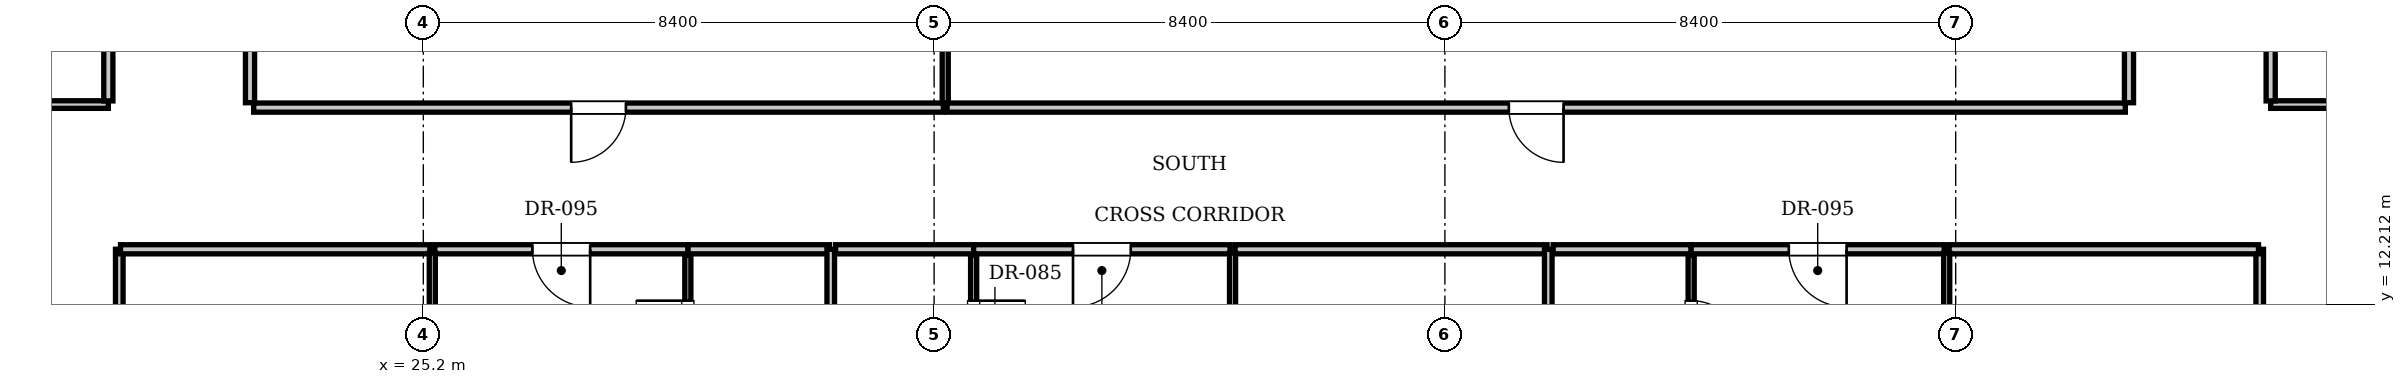
"""IFC4 building model, lengths in metres.
Left out: names, types, materials, properties, quantities, classifications, styles, units other than length and angle.
Written with IfcOpenShell. Run it as: python <this file> out.ifc"""

import sys

from ifc_helpers import new_model, si_unit, direction, frame, frame_2d, origin, place, context, subcontext, project, spatial, rectangle, extrude, element, fill, save


model = new_model("IFC4")
c1 = context("Model", 3, precision=1e-05, world=origin(), true_north=direction((0.0, 1.0)))
c2 = subcontext(c1, "Body", "Model", "MODEL_VIEW")
j1 = project(units=[si_unit("LENGTHUNIT", "METRE"), si_unit("PLANEANGLEUNIT", "RADIAN")], contexts=[c1])
p1 = place(None, origin())
s1 = spatial("IfcSite", under=j1, at=p1, CompositionType="ELEMENT")
p2 = place(p1, origin())
s2 = spatial("IfcBuilding", under=s1, at=p2, CompositionType="ELEMENT")
p3 = place(p2, frame((0.0, 0.0, 73.15)))
s3 = spatial("IfcBuildingStorey", under=s2, at=p3, CompositionType="ELEMENT", Elevation=73.15)
for number, where, z_axis, x_axis in (
    (1, (22.35, 15.53, 0.0), (0.0, 0.0, 1.0), (0.0, 1.0, 0.0)),
    (2, (53.25, 15.53, 0.0), (0.0, 0.0, 1.0), (0.0, 1.0, 0.0)),
):
    element("IfcWall", number, at=place(p3, frame(where, z_axis=z_axis, x_axis=x_axis)), inside=s3, PredefinedType="PARTITIONING", context=c2, shape_type="SweptSolid", body=[
        extrude(rectangle(XDim=8.34, YDim=0.15, at=frame_2d((4.17, 0.0))), origin(), (0.0, 0.0, 1.0), 3.61),
    ])
p4 = place(p3, frame((22.41, 15.45, 0.0), z_axis=(0.0, 0.0, 1.0), x_axis=(1.0, 0.0, 0.0)))
e3 = element("IfcWall", 3, at=p4, inside=s3, PredefinedType="PARTITIONING", context=c2, shape_type="SweptSolid", body=[
    extrude(rectangle(XDim=11.343, YDim=0.15, at=frame_2d((5.671, 0.0))), origin(), (0.0, 0.0, 1.0), 3.61),
])
p5 = place(p4, frame((5.221, 0.0, 0.0)))
e4 = element("IfcOpeningElement", 4, at=p5, cuts=e3, PredefinedType="OPENING", context=c2, shape_type="SweptSolid", body=[
    extrude(rectangle(XDim=0.9, YDim=2.1, at=frame_2d((0.45, 1.05))), frame((0.0, 0.085, 0.0), z_axis=(0.0, -1.0, 0.0), x_axis=(1.0, 0.0, 0.0)), (0.0, 0.0, 1.0), 0.17),
])
p6 = place(p3, frame((33.783, 15.53, 0.0), z_axis=(0.0, 0.0, 1.0), x_axis=(0.0, 1.0, 0.0)))
e5 = element("IfcWall", 5, at=p6, inside=s3, PredefinedType="PARTITIONING", context=c2, shape_type="SweptSolid", body=[
    extrude(rectangle(XDim=8.34, YDim=0.1, at=frame_2d((4.17, 0.0))), origin(), (0.0, 0.0, 1.0), 2.999),
])
p7 = place(p3, frame((33.813, 15.45, 0.0), z_axis=(0.0, 0.0, 1.0), x_axis=(1.0, 0.0, 0.0)))
e6 = element("IfcWall", 6, at=p7, inside=s3, PredefinedType="PARTITIONING", context=c2, shape_type="SweptSolid", body=[
    extrude(rectangle(XDim=19.377, YDim=0.15, at=frame_2d((9.688, 0.0))), origin(), (0.0, 0.0, 1.0), 3.61),
])
p8 = place(p7, frame((9.239, 0.0, 0.0)))
e7 = element("IfcOpeningElement", 7, at=p8, cuts=e6, PredefinedType="OPENING", context=c2, shape_type="SweptSolid", body=[
    extrude(rectangle(XDim=0.9, YDim=2.1, at=frame_2d((0.45, 1.05))), frame((0.0, 0.085, 0.0), z_axis=(0.0, -1.0, 0.0), x_axis=(1.0, 0.0, 0.0)), (0.0, 0.0, 1.0), 0.17),
])
for number, where, z_axis, x_axis in (
    (8, (20.2, 0.1, 0.0), (0.0, 0.0, 1.0), (0.0, 1.0, 0.0)),
    (9, (55.4, 0.1, 0.0), (0.0, 0.0, 1.0), (0.0, 1.0, 0.0)),
):
    element("IfcWall", number, at=place(p3, frame(where, z_axis=z_axis, x_axis=x_axis)), inside=s3, PredefinedType="PARTITIONING", context=c2, shape_type="SweptSolid", body=[
        extrude(rectangle(XDim=13.02, YDim=0.125, at=frame_2d((6.51, 0.0))), origin(), (0.0, 0.0, 1.0), 3.61),
    ])
p9 = place(p3, frame((29.55, 13.12, 0.0), z_axis=(0.0, 0.0, 1.0), x_axis=(1.0, 0.0, 0.0)))
e10 = element("IfcWall", 10, at=p9, inside=s3, PredefinedType="PARTITIONING", context=c2, shape_type="SweptSolid", body=[
    extrude(rectangle(XDim=2.33, YDim=0.15, at=frame_2d((1.165, 0.0))), origin(), (0.0, 0.0, 1.0), 3.61),
])
p10 = place(p3, frame((29.55, 10.68, 0.0), z_axis=(0.0, 0.0, 1.0), x_axis=(0.0, 1.0, 0.0)))
e11 = element("IfcWall", 11, at=p10, inside=s3, PredefinedType="PARTITIONING", context=c2, shape_type="SweptSolid", body=[
    extrude(rectangle(XDim=2.34, YDim=0.1, at=frame_2d((1.17, 0.0))), origin(), (0.0, 0.0, 1.0), 3.61),
])
p11 = place(p10, frame((0.745, 0.0, 0.0)))
e12 = element("IfcOpeningElement", 12, at=p11, cuts=e11, PredefinedType="OPENING", context=c2, shape_type="SweptSolid", body=[
    extrude(rectangle(XDim=0.85, YDim=2.1, at=frame_2d((0.425, 1.05))), frame((0.0, 0.06, 0.0), z_axis=(0.0, -1.0, 0.0), x_axis=(1.0, 0.0, 0.0)), (0.0, 0.0, 1.0), 0.12),
])
p12 = place(p3, frame((20.22, 13.12, 0.0), z_axis=(0.0, 0.0, 1.0), x_axis=(1.0, 0.0, 0.0)))
e13 = element("IfcWall", 13, at=p12, inside=s3, PredefinedType="PARTITIONING", context=c2, shape_type="SweptSolid", body=[
    extrude(rectangle(XDim=5.088, YDim=0.15, at=frame_2d((2.544, 0.0))), origin(), (0.0, 0.0, 1.0), 3.61),
])
p13 = place(p3, frame((25.388, 13.12, 0.0), z_axis=(0.0, 0.0, 1.0), x_axis=(1.0, 0.0, 0.0)))
e14 = element("IfcWall", 14, at=p13, inside=s3, PredefinedType="PARTITIONING", context=c2, shape_type="SweptSolid", body=[
    extrude(rectangle(XDim=4.162, YDim=0.15, at=frame_2d((2.081, 0.0))), origin(), (0.0, 0.0, 1.0), 3.61),
])
p14 = place(p13, frame((1.606, 0.0, 0.0)))
e15 = element("IfcOpeningElement", 15, at=p14, cuts=e14, PredefinedType="OPENING", context=c2, shape_type="SweptSolid", body=[
    extrude(rectangle(XDim=0.95, YDim=2.15, at=frame_2d((0.475, 1.075))), frame((0.0, 0.085, 0.0), z_axis=(0.0, -1.0, 0.0), x_axis=(1.0, 0.0, 0.0)), (0.0, 0.0, 1.0), 0.17),
])
p15 = place(p3, frame((25.348, 0.03, 0.0), z_axis=(0.0, 0.0, 1.0), x_axis=(0.0, 1.0, 0.0)))
e16 = element("IfcWall", 16, at=p15, inside=s3, PredefinedType="PARTITIONING", context=c2, shape_type="SweptSolid", body=[
    extrude(rectangle(XDim=13.03, YDim=0.1, at=frame_2d((6.515, 0.0))), origin(), (0.0, 0.0, 1.0), 2.999),
])
p16 = place(p15, frame((1.6, 0.0, 0.0)))
e17 = element("IfcOpeningElement", 17, at=p16, cuts=e16, PredefinedType="OPENING", context=c2, shape_type="SweptSolid", body=[
    extrude(rectangle(XDim=0.9, YDim=2.1, at=frame_2d((0.45, 1.05))), frame((0.0, 0.06, 0.0), z_axis=(0.0, -1.0, 0.0), x_axis=(1.0, 0.0, 0.0)), (0.0, 0.0, 1.0), 0.12),
])
p17 = place(p3, frame((31.9, 0.1, 0.0), z_axis=(0.0, 0.0, 1.0), x_axis=(0.0, 1.0, 0.0)))
e18 = element("IfcWall", 18, at=p17, inside=s3, PredefinedType="PARTITIONING", context=c2, shape_type="SweptSolid", body=[
    extrude(rectangle(XDim=13.02, YDim=0.125, at=frame_2d((6.51, 0.0))), origin(), (0.0, 0.0, 1.0), 3.61),
])
p18 = place(p3, frame((31.98, 13.12, 0.0), z_axis=(0.0, 0.0, 1.0), x_axis=(1.0, 0.0, 0.0)))
e19 = element("IfcWall", 19, at=p18, inside=s3, PredefinedType="PARTITIONING", context=c2, shape_type="SweptSolid", body=[
    extrude(rectangle(XDim=2.27, YDim=0.15, at=frame_2d((1.135, 0.0))), origin(), (0.0, 0.0, 1.0), 3.61),
])
p19 = place(p3, frame((34.25, 10.68, 0.0), z_axis=(0.0, 0.0, 1.0), x_axis=(0.0, 1.0, 0.0)))
e20 = element("IfcWall", 20, at=p19, inside=s3, PredefinedType="PARTITIONING", context=c2, shape_type="SweptSolid", body=[
    extrude(rectangle(XDim=2.34, YDim=0.1, at=frame_2d((1.17, 0.0))), origin(), (0.0, 0.0, 1.0), 3.61),
])
p20 = place(p19, frame((0.745, 0.0, 0.0)))
e21 = element("IfcOpeningElement", 21, at=p20, cuts=e20, PredefinedType="OPENING", context=c2, shape_type="SweptSolid", body=[
    extrude(rectangle(XDim=0.85, YDim=2.1, at=frame_2d((0.425, 1.05))), frame((0.0, 0.06, 0.0), z_axis=(0.0, -1.0, 0.0), x_axis=(1.0, 0.0, 0.0)), (0.0, 0.0, 1.0), 0.12),
])
p21 = place(p3, frame((34.25, 13.12, 0.0), z_axis=(0.0, 0.0, 1.0), x_axis=(1.0, 0.0, 0.0)))
e22 = element("IfcWall", 22, at=p21, inside=s3, PredefinedType="PARTITIONING", context=c2, shape_type="SweptSolid", body=[
    extrude(rectangle(XDim=4.218, YDim=0.15, at=frame_2d((2.109, 0.0))), origin(), (0.0, 0.0, 1.0), 3.61),
])
p22 = place(p21, frame((1.634, 0.0, 0.0)))
e23 = element("IfcOpeningElement", 23, at=p22, cuts=e22, PredefinedType="OPENING", context=c2, shape_type="SweptSolid", body=[
    extrude(rectangle(XDim=0.95, YDim=2.15, at=frame_2d((0.475, 1.075))), frame((0.0, 0.085, 0.0), z_axis=(0.0, -1.0, 0.0), x_axis=(1.0, 0.0, 0.0)), (0.0, 0.0, 1.0), 0.17),
])
p23 = place(p3, frame((38.548, 13.12, 0.0), z_axis=(0.0, 0.0, 1.0), x_axis=(1.0, 0.0, 0.0)))
e24 = element("IfcWall", 24, at=p23, inside=s3, PredefinedType="PARTITIONING", context=c2, shape_type="SweptSolid", body=[
    extrude(rectangle(XDim=5.132, YDim=0.15, at=frame_2d((2.566, 0.0))), origin(), (0.0, 0.0, 1.0), 3.61),
])
p24 = place(p3, frame((38.508, 0.03, 0.0), z_axis=(0.0, 0.0, 1.0), x_axis=(0.0, 1.0, 0.0)))
e25 = element("IfcWall", 25, at=p24, inside=s3, PredefinedType="PARTITIONING", context=c2, shape_type="SweptSolid", body=[
    extrude(rectangle(XDim=13.03, YDim=0.1, at=frame_2d((6.515, 0.0))), origin(), (0.0, 0.0, 1.0), 3.61),
])
p25 = place(p24, frame((1.6, 0.0, 0.0)))
e26 = element("IfcOpeningElement", 26, at=p25, cuts=e25, PredefinedType="OPENING", context=c2, shape_type="SweptSolid", body=[
    extrude(rectangle(XDim=0.9, YDim=2.1, at=frame_2d((0.45, 1.05))), frame((0.0, 0.06, 0.0), z_axis=(0.0, -1.0, 0.0), x_axis=(1.0, 0.0, 0.0)), (0.0, 0.0, 1.0), 0.12),
])
p26 = place(p3, frame((43.7, 0.1, 0.0), z_axis=(0.0, 0.0, 1.0), x_axis=(0.0, 1.0, 0.0)))
e27 = element("IfcWall", 27, at=p26, inside=s3, PredefinedType="PARTITIONING", context=c2, shape_type="SweptSolid", body=[
    extrude(rectangle(XDim=13.02, YDim=0.125, at=frame_2d((6.51, 0.0))), origin(), (0.0, 0.0, 1.0), 3.61),
])
p27 = place(p3, frame((43.78, 13.12, 0.0), z_axis=(0.0, 0.0, 1.0), x_axis=(1.0, 0.0, 0.0)))
e28 = element("IfcWall", 28, at=p27, inside=s3, PredefinedType="PARTITIONING", context=c2, shape_type="SweptSolid", body=[
    extrude(rectangle(XDim=2.27, YDim=0.15, at=frame_2d((1.135, 0.0))), origin(), (0.0, 0.0, 1.0), 3.61),
])
p28 = place(p3, frame((46.05, 10.68, 0.0), z_axis=(0.0, 0.0, 1.0), x_axis=(0.0, 1.0, 0.0)))
e29 = element("IfcWall", 29, at=p28, inside=s3, PredefinedType="PARTITIONING", context=c2, shape_type="SweptSolid", body=[
    extrude(rectangle(XDim=2.34, YDim=0.1, at=frame_2d((1.17, 0.0))), origin(), (0.0, 0.0, 1.0), 3.304),
])
p29 = place(p28, frame((0.745, 0.0, 0.0)))
e30 = element("IfcOpeningElement", 30, at=p29, cuts=e29, PredefinedType="OPENING", context=c2, shape_type="SweptSolid", body=[
    extrude(rectangle(XDim=0.85, YDim=2.1, at=frame_2d((0.425, 1.05))), frame((0.0, 0.06, 0.0), z_axis=(0.0, -1.0, 0.0), x_axis=(1.0, 0.0, 0.0)), (0.0, 0.0, 1.0), 0.12),
])
p30 = place(p3, frame((46.05, 13.12, 0.0), z_axis=(0.0, 0.0, 1.0), x_axis=(1.0, 0.0, 0.0)))
e31 = element("IfcWall", 31, at=p30, inside=s3, PredefinedType="PARTITIONING", context=c2, shape_type="SweptSolid", body=[
    extrude(rectangle(XDim=4.162, YDim=0.15, at=frame_2d((2.081, 0.0))), origin(), (0.0, 0.0, 1.0), 3.61),
])
p31 = place(p30, frame((1.606, 0.0, 0.0)))
e32 = element("IfcOpeningElement", 32, at=p31, cuts=e31, PredefinedType="OPENING", context=c2, shape_type="SweptSolid", body=[
    extrude(rectangle(XDim=0.95, YDim=2.15, at=frame_2d((0.475, 1.075))), frame((0.0, 0.085, 0.0), z_axis=(0.0, -1.0, 0.0), x_axis=(1.0, 0.0, 0.0)), (0.0, 0.0, 1.0), 0.17),
])
p32 = place(p3, frame((50.292, 13.12, 0.0), z_axis=(0.0, 0.0, 1.0), x_axis=(1.0, 0.0, 0.0)))
e33 = element("IfcWall", 33, at=p32, inside=s3, PredefinedType="PARTITIONING", context=c2, shape_type="SweptSolid", body=[
    extrude(rectangle(XDim=5.088, YDim=0.15, at=frame_2d((2.544, 0.0))), origin(), (0.0, 0.0, 1.0), 3.61),
])
p33 = place(p3, frame((50.252, 0.03, 0.0), z_axis=(0.0, 0.0, 1.0), x_axis=(0.0, 1.0, 0.0)))
e34 = element("IfcWall", 34, at=p33, inside=s3, PredefinedType="PARTITIONING", context=c2, shape_type="SweptSolid", body=[
    extrude(rectangle(XDim=13.03, YDim=0.1, at=frame_2d((6.515, 0.0))), origin(), (0.0, 0.0, 1.0), 2.999),
])
p34 = place(p33, frame((1.6, 0.0, 0.0)))
e35 = element("IfcOpeningElement", 35, at=p34, cuts=e34, PredefinedType="OPENING", context=c2, shape_type="SweptSolid", body=[
    extrude(rectangle(XDim=0.9, YDim=2.1, at=frame_2d((0.45, 1.05))), frame((0.0, 0.06, 0.0), z_axis=(0.0, -1.0, 0.0), x_axis=(1.0, 0.0, 0.0)), (0.0, 0.0, 1.0), 0.12),
])
p35 = place(p3, frame((10.9, 15.5, 0.0), z_axis=(0.0, 0.0, 1.0), x_axis=(1.0, 0.0, 0.0)))
e36 = element("IfcWall", 36, at=p35, inside=s3, PredefinedType="PARTITIONING", context=c2, shape_type="SweptSolid", body=[
    extrude(rectangle(XDim=9.12, YDim=0.125, at=frame_2d((4.56, 0.0))), origin(), (0.0, 0.0, 1.0), 3.61),
])
p36 = place(p3, frame((55.58, 15.5, 0.0), z_axis=(0.0, 0.0, 1.0), x_axis=(1.0, 0.0, 0.0)))
e37 = element("IfcWall", 37, at=p36, inside=s3, PredefinedType="PARTITIONING", context=c2, shape_type="SweptSolid", body=[
    extrude(rectangle(XDim=9.12, YDim=0.125, at=frame_2d((4.56, 0.0))), origin(), (0.0, 0.0, 1.0), 3.61),
])
p37 = place(p3, frame((20.02, 15.56, 0.0), z_axis=(0.0, 0.0, 1.0), x_axis=(0.0, 1.0, 0.0)))
e38 = element("IfcWall", 38, at=p37, inside=s3, PredefinedType="PARTITIONING", context=c2, shape_type="SweptSolid", body=[
    extrude(rectangle(XDim=6.14, YDim=0.15, at=frame_2d((3.07, 0.0))), origin(), (0.0, 0.0, 1.0), 3.61),
])
p38 = place(p37, frame((2.595, 0.0, 0.0)))
e39 = element("IfcOpeningElement", 39, at=p38, cuts=e38, PredefinedType="OPENING", context=c2, shape_type="SweptSolid", body=[
    extrude(rectangle(XDim=0.95, YDim=2.15, at=frame_2d((0.475, 1.075))), frame((0.0, 0.085, 0.0), z_axis=(0.0, -1.0, 0.0), x_axis=(1.0, 0.0, 0.0)), (0.0, 0.0, 1.0), 0.17),
])
p39 = place(p3, frame((55.58, 15.56, 0.0), z_axis=(0.0, 0.0, 1.0), x_axis=(0.0, 1.0, 0.0)))
e40 = element("IfcWall", 40, at=p39, inside=s3, PredefinedType="PARTITIONING", context=c2, shape_type="SweptSolid", body=[
    extrude(rectangle(XDim=6.14, YDim=0.15, at=frame_2d((3.07, 0.0))), origin(), (0.0, 0.0, 1.0), 3.61),
])
p40 = place(p39, frame((2.595, 0.0, 0.0)))
e41 = element("IfcOpeningElement", 41, at=p40, cuts=e40, PredefinedType="OPENING", context=c2, shape_type="SweptSolid", body=[
    extrude(rectangle(XDim=0.95, YDim=2.15, at=frame_2d((0.475, 1.075))), frame((0.0, 0.085, 0.0), z_axis=(0.0, -1.0, 0.0), x_axis=(1.0, 0.0, 0.0)), (0.0, 0.0, 1.0), 0.17),
])
p41 = place(p5, frame((0.9, 0.0, 0.0), z_axis=(0.0, 0.0, 1.0), x_axis=(-1.0, 0.0, 0.0)))
e42 = element("IfcDoor", 42, at=p41, inside=s3, OperationType="SINGLE_SWING_RIGHT", PredefinedType="DOOR", context=c2, shape_type="SweptSolid", body=[
    extrude(rectangle(XDim=0.9, YDim=2.1, at=frame_2d((0.45, 1.05))), frame((0.0, 0.025, 0.0), z_axis=(0.0, -1.0, 0.0), x_axis=(1.0, 0.0, 0.0)), (0.0, 0.0, 1.0), 0.05),
])
fill(e4, e42)
p42 = place(p8, frame((0.9, 0.0, 0.0), z_axis=(0.0, 0.0, 1.0), x_axis=(-1.0, 0.0, 0.0)))
e43 = element("IfcDoor", 43, at=p42, inside=s3, OperationType="SINGLE_SWING_LEFT", PredefinedType="DOOR", context=c2, shape_type="SweptSolid", body=[
    extrude(rectangle(XDim=0.9, YDim=2.1, at=frame_2d((0.45, 1.05))), frame((0.0, 0.025, 0.0), z_axis=(0.0, -1.0, 0.0), x_axis=(1.0, 0.0, 0.0)), (0.0, 0.0, 1.0), 0.05),
])
fill(e7, e43)
p43 = place(p11, origin())
e44 = element("IfcDoor", 44, at=p43, inside=s3, OperationType="SINGLE_SWING_RIGHT", PredefinedType="DOOR", context=c2, shape_type="SweptSolid", body=[
    extrude(rectangle(XDim=0.85, YDim=2.1, at=frame_2d((0.425, 1.05))), frame((0.0, 0.025, 0.0), z_axis=(0.0, -1.0, 0.0), x_axis=(1.0, 0.0, 0.0)), (0.0, 0.0, 1.0), 0.05),
])
fill(e12, e44)
p44 = place(p14, frame((0.95, 0.0, 0.0), z_axis=(0.0, 0.0, 1.0), x_axis=(-1.0, 0.0, 0.0)))
e45 = element("IfcDoor", 45, at=p44, inside=s3, OperationType="SINGLE_SWING_LEFT", PredefinedType="DOOR", context=c2, shape_type="SweptSolid", body=[
    extrude(rectangle(XDim=0.95, YDim=2.15, at=frame_2d((0.475, 1.075))), frame((0.0, 0.025, 0.0), z_axis=(0.0, -1.0, 0.0), x_axis=(1.0, 0.0, 0.0)), (0.0, 0.0, 1.0), 0.05),
])
fill(e15, e45)
p45 = place(p20, frame((0.85, 0.0, 0.0), z_axis=(0.0, 0.0, 1.0), x_axis=(-1.0, 0.0, 0.0)))
e46 = element("IfcDoor", 46, at=p45, inside=s3, OperationType="SINGLE_SWING_LEFT", PredefinedType="DOOR", context=c2, shape_type="SweptSolid", body=[
    extrude(rectangle(XDim=0.85, YDim=2.1, at=frame_2d((0.425, 1.05))), frame((0.0, 0.025, 0.0), z_axis=(0.0, -1.0, 0.0), x_axis=(1.0, 0.0, 0.0)), (0.0, 0.0, 1.0), 0.05),
])
fill(e21, e46)
p46 = place(p22, frame((0.95, 0.0, 0.0), z_axis=(0.0, 0.0, 1.0), x_axis=(-1.0, 0.0, 0.0)))
e47 = element("IfcDoor", 47, at=p46, inside=s3, OperationType="SINGLE_SWING_RIGHT", PredefinedType="DOOR", context=c2, shape_type="SweptSolid", body=[
    extrude(rectangle(XDim=0.95, YDim=2.15, at=frame_2d((0.475, 1.075))), frame((0.0, 0.025, 0.0), z_axis=(0.0, -1.0, 0.0), x_axis=(1.0, 0.0, 0.0)), (0.0, 0.0, 1.0), 0.05),
])
fill(e23, e47)
p47 = place(p29, frame((0.85, 0.0, 0.0), z_axis=(0.0, 0.0, 1.0), x_axis=(-1.0, 0.0, 0.0)))
e48 = element("IfcDoor", 48, at=p47, inside=s3, OperationType="SINGLE_SWING_RIGHT", PredefinedType="DOOR", context=c2, shape_type="SweptSolid", body=[
    extrude(rectangle(XDim=0.85, YDim=2.1, at=frame_2d((0.425, 1.05))), frame((0.0, 0.025, 0.0), z_axis=(0.0, -1.0, 0.0), x_axis=(1.0, 0.0, 0.0)), (0.0, 0.0, 1.0), 0.05),
])
fill(e30, e48)
p48 = place(p31, frame((0.95, 0.0, 0.0), z_axis=(0.0, 0.0, 1.0), x_axis=(-1.0, 0.0, 0.0)))
e49 = element("IfcDoor", 49, at=p48, inside=s3, OperationType="SINGLE_SWING_LEFT", PredefinedType="DOOR", context=c2, shape_type="SweptSolid", body=[
    extrude(rectangle(XDim=0.95, YDim=2.15, at=frame_2d((0.475, 1.075))), frame((0.0, 0.025, 0.0), z_axis=(0.0, -1.0, 0.0), x_axis=(1.0, 0.0, 0.0)), (0.0, 0.0, 1.0), 0.05),
])
fill(e32, e49)
save(model, sys.argv[1])
